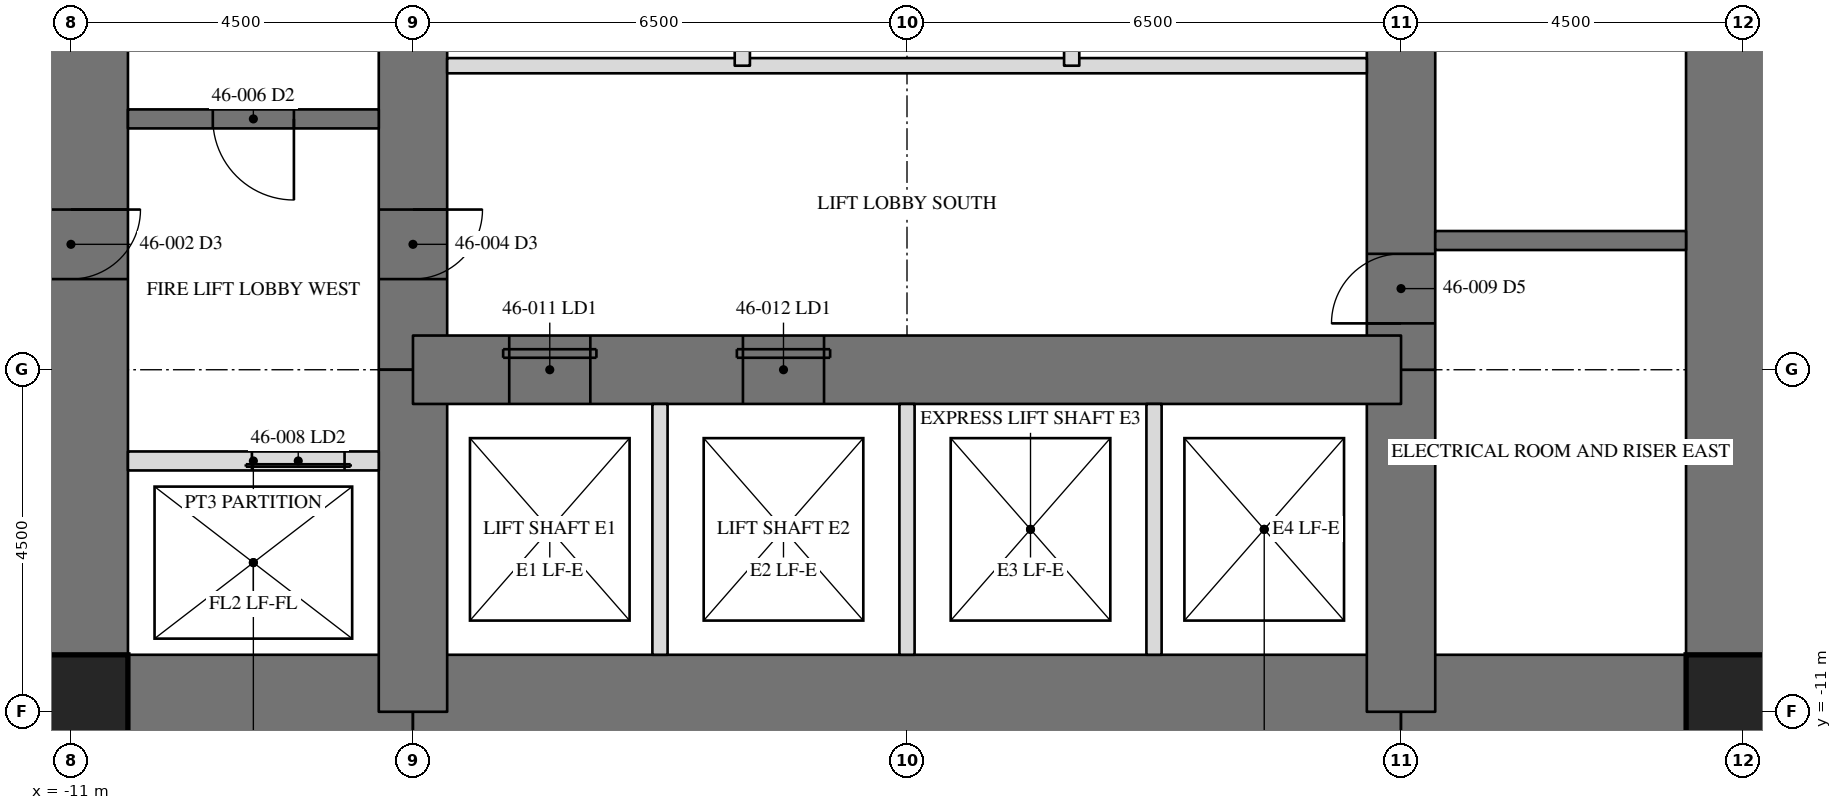
"""IFC4 building model, lengths in metres.
Left out: names, types, materials, properties, quantities, classifications, styles, units other than length and angle.
Written with IfcOpenShell. Run it as: python <this file> out.ifc"""

import sys

from ifc_helpers import new_model, si_unit, direction, frame, frame_2d, origin, origin_2d, place, context, subcontext, project, spatial, rectangle, hollow_rectangle, extrude, element, fill, save


model = new_model("IFC4")
c1 = context("Model", 3, precision=1e-05, world=origin(), true_north=direction((0.0, 1.0)))
c2 = subcontext(c1, "Body", "Model", "MODEL_VIEW")
j1 = project(units=[si_unit("LENGTHUNIT", "METRE"), si_unit("PLANEANGLEUNIT", "RADIAN")], contexts=[c1])
p1 = place(None, origin())
s1 = spatial("IfcSite", under=j1, at=p1, CompositionType="ELEMENT")
p2 = place(p1, origin())
s2 = spatial("IfcBuilding", under=s1, at=p2, CompositionType="ELEMENT")
p3 = place(p2, frame((0.0, 0.0, 197.7)))
s3 = spatial("IfcBuildingStorey", under=s2, at=p3, CompositionType="ELEMENT", Elevation=197.7)
p4 = place(p3, frame((11.0, -11.0, 0.0), z_axis=(0.0, 0.0, 1.0), x_axis=(0.0, 1.0, 0.0)))
e1 = element("IfcWall", 1, at=p4, inside=s3, PredefinedType="SHEAR", context=c2, shape_type="SweptSolid", body=[
    extrude(rectangle(XDim=22.0, YDim=1.5, at=frame_2d((11.0, 0.0))), origin(), (0.0, 0.0, 1.0), 3.5),
])
p5 = place(p4, frame((15.393, 0.0, 0.0)))
e2 = element("IfcOpeningElement", 2, at=p5, cuts=e1, PredefinedType="OPENING", context=c2, shape_type="SweptSolid", body=[
    extrude(rectangle(XDim=0.915, YDim=2.134, at=frame_2d((0.458, 1.067))), frame((0.0, 0.76, 0.0), z_axis=(0.0, -1.0, 0.0), x_axis=(1.0, 0.0, 0.0)), (0.0, 0.0, 1.0), 1.52),
])
p6 = place(p3, frame((-11.0, 11.0, 0.0), z_axis=(0.0, 0.0, 1.0), x_axis=(0.0, -1.0, 0.0)))
e3 = element("IfcWall", 3, at=p6, inside=s3, PredefinedType="SHEAR", context=c2, shape_type="SweptSolid", body=[
    extrude(rectangle(XDim=22.0, YDim=1.5, at=frame_2d((11.0, 0.0))), origin(), (0.0, 0.0, 1.0), 3.5),
])
p7 = place(p6, frame((15.393, 0.0, 0.0)))
e4 = element("IfcOpeningElement", 4, at=p7, cuts=e3, PredefinedType="OPENING", context=c2, shape_type="SweptSolid", body=[
    extrude(rectangle(XDim=0.915, YDim=2.134, at=frame_2d((0.458, 1.067))), frame((0.0, 0.76, 0.0), z_axis=(0.0, -1.0, 0.0), x_axis=(1.0, 0.0, 0.0)), (0.0, 0.0, 1.0), 1.52),
])
p8 = place(p3, frame((-11.0, -11.0, 0.0), z_axis=(0.0, 0.0, 1.0), x_axis=(1.0, 0.0, 0.0)))
e5 = element("IfcWall", 5, at=p8, inside=s3, PredefinedType="SHEAR", context=c2, shape_type="SweptSolid", body=[
    extrude(rectangle(XDim=4.5, YDim=1.5, at=frame_2d((2.25, 0.0))), origin(), (0.0, 0.0, 1.0), 3.5),
])
p9 = place(p3, frame((-6.5, -11.0, 0.0), z_axis=(0.0, 0.0, 1.0), x_axis=(1.0, 0.0, 0.0)))
e6 = element("IfcWall", 6, at=p9, inside=s3, PredefinedType="SHEAR", context=c2, shape_type="SweptSolid", body=[
    extrude(rectangle(XDim=13.0, YDim=1.5, at=frame_2d((6.5, 0.0))), origin(), (0.0, 0.0, 1.0), 3.5),
])
p10 = place(p3, frame((6.5, -11.0, 0.0), z_axis=(0.0, 0.0, 1.0), x_axis=(1.0, 0.0, 0.0)))
e7 = element("IfcWall", 7, at=p10, inside=s3, PredefinedType="SHEAR", context=c2, shape_type="SweptSolid", body=[
    extrude(rectangle(XDim=4.5, YDim=1.5, at=frame_2d((2.25, 0.0))), origin(), (0.0, 0.0, 1.0), 3.5),
])
p11 = place(p3, frame((6.5, -11.0, 0.0), z_axis=(0.0, 0.0, 1.0), x_axis=(0.0, 1.0, 0.0)))
e8 = element("IfcWall", 8, at=p11, inside=s3, PredefinedType="SHEAR", context=c2, shape_type="SweptSolid", body=[
    extrude(rectangle(XDim=4.5, YDim=0.9, at=frame_2d((2.25, 0.0))), origin(), (0.0, 0.0, 1.0), 3.5),
])
p12 = place(p3, frame((6.5, -6.5, 0.0), z_axis=(0.0, 0.0, 1.0), x_axis=(0.0, 1.0, 0.0)))
e9 = element("IfcWall", 9, at=p12, inside=s3, PredefinedType="SHEAR", context=c2, shape_type="SweptSolid", body=[
    extrude(rectangle(XDim=13.0, YDim=0.9, at=frame_2d((6.5, 0.0))), origin(), (0.0, 0.0, 1.0), 3.5),
])
p13 = place(p12, frame((10.893, 0.0, 0.0)))
e10 = element("IfcOpeningElement", 10, at=p13, cuts=e9, PredefinedType="OPENING", context=c2, shape_type="SweptSolid", body=[
    extrude(rectangle(XDim=0.915, YDim=2.134, at=frame_2d((0.458, 1.067))), frame((0.0, 0.46, 0.0), z_axis=(0.0, -1.0, 0.0), x_axis=(1.0, 0.0, 0.0)), (0.0, 0.0, 1.0), 0.92),
])
p14 = place(p12, frame((0.61, 0.0, 0.0)))
e11 = element("IfcOpeningElement", 11, at=p14, cuts=e9, PredefinedType="OPENING", context=c2, shape_type="SweptSolid", body=[
    extrude(rectangle(XDim=0.915, YDim=2.134, at=frame_2d((0.458, 1.067))), frame((0.0, 0.46, 0.0), z_axis=(0.0, -1.0, 0.0), x_axis=(1.0, 0.0, 0.0)), (0.0, 0.0, 1.0), 0.92),
])
p15 = place(p3, frame((-6.5, 6.5, 0.0), z_axis=(0.0, 0.0, 1.0), x_axis=(0.0, -1.0, 0.0)))
e12 = element("IfcWall", 12, at=p15, inside=s3, PredefinedType="SHEAR", context=c2, shape_type="SweptSolid", body=[
    extrude(rectangle(XDim=13.0, YDim=0.9, at=frame_2d((6.5, 0.0))), origin(), (0.0, 0.0, 1.0), 3.5),
])
p16 = place(p15, frame((10.893, 0.0, 0.0)))
e13 = element("IfcOpeningElement", 13, at=p16, cuts=e12, PredefinedType="OPENING", context=c2, shape_type="SweptSolid", body=[
    extrude(rectangle(XDim=0.915, YDim=2.134, at=frame_2d((0.458, 1.067))), frame((0.0, 0.46, 0.0), z_axis=(0.0, -1.0, 0.0), x_axis=(1.0, 0.0, 0.0)), (0.0, 0.0, 1.0), 0.92),
])
p17 = place(p15, frame((0.61, 0.0, 0.0)))
e14 = element("IfcOpeningElement", 14, at=p17, cuts=e12, PredefinedType="OPENING", context=c2, shape_type="SweptSolid", body=[
    extrude(rectangle(XDim=0.915, YDim=2.134, at=frame_2d((0.458, 1.067))), frame((0.0, 0.46, 0.0), z_axis=(0.0, -1.0, 0.0), x_axis=(1.0, 0.0, 0.0)), (0.0, 0.0, 1.0), 0.92),
])
p18 = place(p3, frame((-6.5, -6.5, 0.0), z_axis=(0.0, 0.0, 1.0), x_axis=(0.0, -1.0, 0.0)))
e15 = element("IfcWall", 15, at=p18, inside=s3, PredefinedType="SHEAR", context=c2, shape_type="SweptSolid", body=[
    extrude(rectangle(XDim=4.5, YDim=0.9, at=frame_2d((2.25, 0.0))), origin(), (0.0, 0.0, 1.0), 3.5),
])
p19 = place(p3, frame((-6.5, -6.5, 0.0), z_axis=(0.0, 0.0, 1.0), x_axis=(1.0, 0.0, 0.0)))
e16 = element("IfcWall", 16, at=p19, inside=s3, PredefinedType="SHEAR", context=c2, shape_type="SweptSolid", body=[
    extrude(rectangle(XDim=13.0, YDim=0.9, at=frame_2d((6.5, 0.0))), origin(), (0.0, 0.0, 1.0), 3.5),
])
p20 = place(p19, frame((1.267, 0.0, 0.0)))
e17 = element("IfcOpeningElement", 17, at=p20, cuts=e16, PredefinedType="OPENING", context=c2, shape_type="SweptSolid", body=[
    extrude(rectangle(XDim=1.067, YDim=2.134, at=frame_2d((0.533, 1.067))), frame((0.0, 0.46, 0.0), z_axis=(0.0, -1.0, 0.0), x_axis=(1.0, 0.0, 0.0)), (0.0, 0.0, 1.0), 0.92),
])
p21 = place(p19, frame((4.342, 0.0, 0.0)))
e18 = element("IfcOpeningElement", 18, at=p21, cuts=e16, PredefinedType="OPENING", context=c2, shape_type="SweptSolid", body=[
    extrude(rectangle(XDim=1.067, YDim=2.134, at=frame_2d((0.533, 1.067))), frame((0.0, 0.46, 0.0), z_axis=(0.0, -1.0, 0.0), x_axis=(1.0, 0.0, 0.0)), (0.0, 0.0, 1.0), 0.92),
])
for number, where, z_axis, x_axis in (
    (19, (-11.0, -11.0, 0.0), (0.0, 0.0, 1.0), (1.0, 0.0, 0.0)),
    (20, (11.0, -11.0, 0.0), (0.0, 0.0, 1.0), (1.0, 0.0, 0.0)),
):
    element("IfcColumn", number, at=place(p3, frame(where, z_axis=z_axis, x_axis=x_axis)), inside=s3, PredefinedType="COLUMN", context=c2, shape_type="SweptSolid", body=[
        extrude(hollow_rectangle(XDim=1.499, YDim=1.499, WallThickness=0.102, at=origin_2d()), origin(), (0.0, 0.0, 1.0), 3.5),
    ])
p22 = place(p3, frame((6.95, -4.8, 0.0), z_axis=(0.0, 0.0, 1.0), x_axis=(1.0, 0.0, 0.0)))
e21 = element("IfcWall", 21, at=p22, inside=s3, PredefinedType="SOLIDWALL", context=c2, shape_type="SweptSolid", body=[
    extrude(rectangle(XDim=3.3, YDim=0.25, at=frame_2d((1.65, 0.0))), origin(), (0.0, 0.0, 1.0), 3.31),
])
p23 = place(p3, frame((-6.95, -3.2, 0.0), z_axis=(0.0, 0.0, 1.0), x_axis=(-1.0, 0.0, 0.0)))
e22 = element("IfcWall", 22, at=p23, inside=s3, PredefinedType="SOLIDWALL", context=c2, shape_type="SweptSolid", body=[
    extrude(rectangle(XDim=3.3, YDim=0.25, at=frame_2d((1.65, 0.0))), origin(), (0.0, 0.0, 1.0), 3.31),
])
p24 = place(p23, frame((1.116, 0.0, 0.0)))
e23 = element("IfcOpeningElement", 23, at=p24, cuts=e22, PredefinedType="OPENING", context=c2, shape_type="SweptSolid", body=[
    extrude(rectangle(XDim=1.067, YDim=2.134, at=frame_2d((0.533, 1.067))), frame((0.0, 0.135, 0.0), z_axis=(0.0, -1.0, 0.0), x_axis=(1.0, 0.0, 0.0)), (0.0, 0.0, 1.0), 0.27),
])
p25 = place(p3, frame((-6.95, -7.7, 0.0), z_axis=(0.0, 0.0, 1.0), x_axis=(-1.0, 0.0, 0.0)))
e24 = element("IfcWall", 24, at=p25, inside=s3, PredefinedType="PARTITIONING", context=c2, shape_type="SweptSolid", body=[
    extrude(rectangle(XDim=3.3, YDim=0.25, at=frame_2d((1.65, 0.0))), origin(), (0.0, 0.0, 1.0), 3.31),
])
p26 = place(p25, frame((0.45, 0.0, 0.0)))
e25 = element("IfcOpeningElement", 25, at=p26, cuts=e24, PredefinedType="OPENING", context=c2, shape_type="SweptSolid", body=[
    extrude(rectangle(XDim=1.219, YDim=2.134, at=frame_2d((0.609, 1.067))), frame((0.0, 0.135, 0.0), z_axis=(0.0, -1.0, 0.0), x_axis=(1.0, 0.0, 0.0)), (0.0, 0.0, 1.0), 0.27),
])
p27 = place(p3, frame((6.05, -2.5, 0.0), z_axis=(0.0, 0.0, 1.0), x_axis=(-1.0, 0.0, 0.0)))
e26 = element("IfcWall", 26, at=p27, inside=s3, PredefinedType="PARTITIONING", context=c2, shape_type="SweptSolid", body=[
    extrude(rectangle(XDim=12.1, YDim=0.2, at=frame_2d((6.05, 0.0))), origin(), (0.0, 0.0, 1.0), 3.31),
])
for number, where, z_axis, x_axis in (
    (27, (-3.25, -10.25, 0.0), (0.0, 0.0, 1.0), (0.0, 1.0, 0.0)),
    (28, (0.0, -10.25, 0.0), (0.0, 0.0, 1.0), (0.0, 1.0, 0.0)),
    (29, (3.25, -10.25, 0.0), (0.0, 0.0, 1.0), (0.0, 1.0, 0.0)),
):
    element("IfcWall", number, at=place(p3, frame(where, z_axis=z_axis, x_axis=x_axis)), inside=s3, PredefinedType="PARTITIONING", context=c2, shape_type="SweptSolid", body=[
        extrude(rectangle(XDim=3.3, YDim=0.2, at=frame_2d((1.65, 0.0))), origin(), (0.0, 0.0, 1.0), 3.31),
    ])
for number, where, z_axis, x_axis in (
    (30, (-2.167, -2.5, 0.0), (0.0, 0.0, 1.0), (0.0, 1.0, 0.0)),
    (31, (2.167, -2.5, 0.0), (0.0, 0.0, 1.0), (0.0, 1.0, 0.0)),
):
    element("IfcWall", number, at=place(p3, frame(where, z_axis=z_axis, x_axis=x_axis)), inside=s3, PredefinedType="PARTITIONING", context=c2, shape_type="SweptSolid", body=[
        extrude(rectangle(XDim=5.0, YDim=0.2, at=frame_2d((2.5, 0.0))), origin(), (0.0, 0.0, 1.0), 3.31),
    ])
p28 = place(p16, origin())
e32 = element("IfcDoor", 32, at=p28, inside=s3, OperationType="SINGLE_SWING_RIGHT", PredefinedType="DOOR", context=c2, shape_type="SweptSolid", body=[
    extrude(rectangle(XDim=0.915, YDim=2.134, at=frame_2d((0.458, 1.067))), frame((0.0, -0.375, 0.0), z_axis=(0.0, -1.0, 0.0), x_axis=(1.0, 0.0, 0.0)), (0.0, 0.0, 1.0), 0.05),
])
fill(e13, e32)
p29 = place(p24, origin())
e33 = element("IfcDoor", 33, at=p29, inside=s3, OperationType="SINGLE_SWING_LEFT", PredefinedType="DOOR", context=c2, shape_type="SweptSolid", body=[
    extrude(rectangle(XDim=1.067, YDim=2.134, at=frame_2d((0.533, 1.067))), frame((0.0, 0.025, 0.0), z_axis=(0.0, -1.0, 0.0), x_axis=(1.0, 0.0, 0.0)), (0.0, 0.0, 1.0), 0.05),
])
fill(e23, e33)
p30 = place(p26, origin())
e34 = element("IfcDoor", 34, at=p30, inside=s3, OperationType="SLIDING_TO_LEFT", PredefinedType="DOOR", context=c2, shape_type="SweptSolid", body=[
    extrude(rectangle(XDim=1.219, YDim=2.134, at=frame_2d((0.609, 1.067))), frame((0.0, 0.025, 0.0), z_axis=(0.0, -1.0, 0.0), x_axis=(1.0, 0.0, 0.0)), (0.0, 0.0, 1.0), 0.05),
])
fill(e25, e34)
p31 = place(p14, origin())
e35 = element("IfcDoor", 35, at=p31, inside=s3, OperationType="SINGLE_SWING_RIGHT", PredefinedType="DOOR", context=c2, shape_type="SweptSolid", body=[
    extrude(rectangle(XDim=0.915, YDim=2.134, at=frame_2d((0.458, 1.067))), frame((0.0, -0.375, 0.0), z_axis=(0.0, -1.0, 0.0), x_axis=(1.0, 0.0, 0.0)), (0.0, 0.0, 1.0), 0.05),
])
fill(e11, e35)
p32 = place(p20, origin())
e36 = element("IfcDoor", 36, at=p32, inside=s3, OperationType="SLIDING_TO_LEFT", PredefinedType="DOOR", context=c2, shape_type="SweptSolid", body=[
    extrude(rectangle(XDim=1.067, YDim=2.134, at=frame_2d((0.533, 1.067))), frame((0.0, -0.375, 0.0), z_axis=(0.0, -1.0, 0.0), x_axis=(1.0, 0.0, 0.0)), (0.0, 0.0, 1.0), 0.05),
])
fill(e17, e36)
p33 = place(p21, origin())
e37 = element("IfcDoor", 37, at=p33, inside=s3, OperationType="SLIDING_TO_LEFT", PredefinedType="DOOR", context=c2, shape_type="SweptSolid", body=[
    extrude(rectangle(XDim=1.067, YDim=2.134, at=frame_2d((0.533, 1.067))), frame((0.0, -0.375, 0.0), z_axis=(0.0, -1.0, 0.0), x_axis=(1.0, 0.0, 0.0)), (0.0, 0.0, 1.0), 0.05),
])
fill(e18, e37)
save(model, sys.argv[1])
